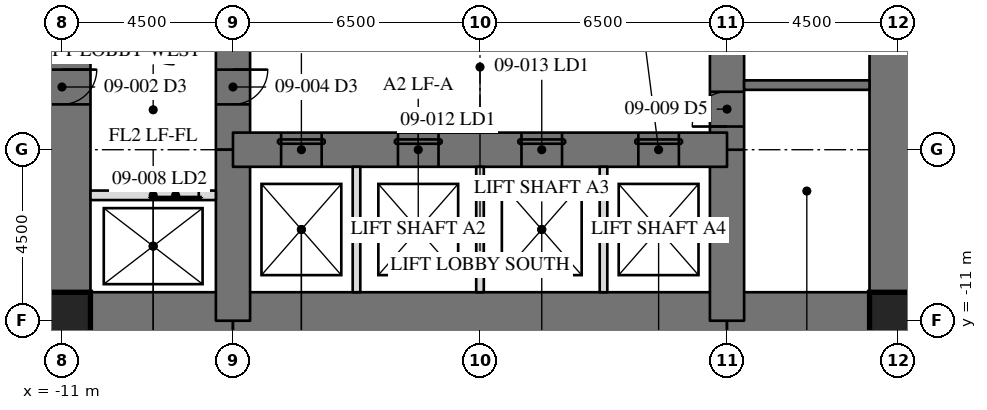
"""IFC4 building model, lengths in metres.
Left out: names, types, materials, properties, quantities, classifications, styles, units other than length and angle.
Written with IfcOpenShell. Run it as: python <this file> out.ifc"""

import sys

from ifc_helpers import new_model, si_unit, direction, frame, frame_2d, origin, origin_2d, place, context, subcontext, project, spatial, rectangle, hollow_rectangle, extrude, element, fill, save


model = new_model("IFC4")
c1 = context("Model", 3, precision=1e-05, world=origin(), true_north=direction((0.0, 1.0)))
c2 = subcontext(c1, "Body", "Model", "MODEL_VIEW")
j1 = project(units=[si_unit("LENGTHUNIT", "METRE"), si_unit("PLANEANGLEUNIT", "RADIAN")], contexts=[c1])
p1 = place(None, origin())
s1 = spatial("IfcSite", under=j1, at=p1, CompositionType="ELEMENT")
p2 = place(p1, origin())
s2 = spatial("IfcBuilding", under=s1, at=p2, CompositionType="ELEMENT")
p3 = place(p2, frame((0.0, 0.0, 40.6)))
s3 = spatial("IfcBuildingStorey", under=s2, at=p3, CompositionType="ELEMENT", Elevation=40.6)
p4 = place(p3, frame((11.0, -11.0, 0.0), z_axis=(0.0, 0.0, 1.0), x_axis=(0.0, 1.0, 0.0)))
e1 = element("IfcWall", 1, at=p4, inside=s3, PredefinedType="SHEAR", context=c2, shape_type="SweptSolid", body=[
    extrude(rectangle(XDim=22.0, YDim=1.5, at=frame_2d((11.0, 0.0))), origin(), (0.0, 0.0, 1.0), 4.1),
])
p5 = place(p4, frame((15.393, 0.0, 0.0)))
e2 = element("IfcOpeningElement", 2, at=p5, cuts=e1, PredefinedType="OPENING", context=c2, shape_type="SweptSolid", body=[
    extrude(rectangle(XDim=0.915, YDim=2.134, at=frame_2d((0.458, 1.067))), frame((0.0, 0.76, 0.0), z_axis=(0.0, -1.0, 0.0), x_axis=(1.0, 0.0, 0.0)), (0.0, 0.0, 1.0), 1.52),
])
p6 = place(p3, frame((-11.0, 11.0, 0.0), z_axis=(0.0, 0.0, 1.0), x_axis=(0.0, -1.0, 0.0)))
e3 = element("IfcWall", 3, at=p6, inside=s3, PredefinedType="SHEAR", context=c2, shape_type="SweptSolid", body=[
    extrude(rectangle(XDim=22.0, YDim=1.5, at=frame_2d((11.0, 0.0))), origin(), (0.0, 0.0, 1.0), 4.1),
])
p7 = place(p6, frame((15.393, 0.0, 0.0)))
e4 = element("IfcOpeningElement", 4, at=p7, cuts=e3, PredefinedType="OPENING", context=c2, shape_type="SweptSolid", body=[
    extrude(rectangle(XDim=0.915, YDim=2.134, at=frame_2d((0.458, 1.067))), frame((0.0, 0.76, 0.0), z_axis=(0.0, -1.0, 0.0), x_axis=(1.0, 0.0, 0.0)), (0.0, 0.0, 1.0), 1.52),
])
p8 = place(p3, frame((-11.0, -11.0, 0.0), z_axis=(0.0, 0.0, 1.0), x_axis=(1.0, 0.0, 0.0)))
e5 = element("IfcWall", 5, at=p8, inside=s3, PredefinedType="SHEAR", context=c2, shape_type="SweptSolid", body=[
    extrude(rectangle(XDim=4.5, YDim=1.5, at=frame_2d((2.25, 0.0))), origin(), (0.0, 0.0, 1.0), 4.1),
])
p9 = place(p3, frame((-6.5, -11.0, 0.0), z_axis=(0.0, 0.0, 1.0), x_axis=(1.0, 0.0, 0.0)))
e6 = element("IfcWall", 6, at=p9, inside=s3, PredefinedType="SHEAR", context=c2, shape_type="SweptSolid", body=[
    extrude(rectangle(XDim=13.0, YDim=1.5, at=frame_2d((6.5, 0.0))), origin(), (0.0, 0.0, 1.0), 4.1),
])
p10 = place(p3, frame((6.5, -11.0, 0.0), z_axis=(0.0, 0.0, 1.0), x_axis=(1.0, 0.0, 0.0)))
e7 = element("IfcWall", 7, at=p10, inside=s3, PredefinedType="SHEAR", context=c2, shape_type="SweptSolid", body=[
    extrude(rectangle(XDim=4.5, YDim=1.5, at=frame_2d((2.25, 0.0))), origin(), (0.0, 0.0, 1.0), 4.1),
])
p11 = place(p3, frame((6.5, -11.0, 0.0), z_axis=(0.0, 0.0, 1.0), x_axis=(0.0, 1.0, 0.0)))
e8 = element("IfcWall", 8, at=p11, inside=s3, PredefinedType="SHEAR", context=c2, shape_type="SweptSolid", body=[
    extrude(rectangle(XDim=4.5, YDim=0.9, at=frame_2d((2.25, 0.0))), origin(), (0.0, 0.0, 1.0), 4.1),
])
p12 = place(p3, frame((6.5, -6.5, 0.0), z_axis=(0.0, 0.0, 1.0), x_axis=(0.0, 1.0, 0.0)))
e9 = element("IfcWall", 9, at=p12, inside=s3, PredefinedType="SHEAR", context=c2, shape_type="SweptSolid", body=[
    extrude(rectangle(XDim=13.0, YDim=0.9, at=frame_2d((6.5, 0.0))), origin(), (0.0, 0.0, 1.0), 4.1),
])
p13 = place(p12, frame((10.893, 0.0, 0.0)))
e10 = element("IfcOpeningElement", 10, at=p13, cuts=e9, PredefinedType="OPENING", context=c2, shape_type="SweptSolid", body=[
    extrude(rectangle(XDim=0.915, YDim=2.134, at=frame_2d((0.458, 1.067))), frame((0.0, 0.46, 0.0), z_axis=(0.0, -1.0, 0.0), x_axis=(1.0, 0.0, 0.0)), (0.0, 0.0, 1.0), 0.92),
])
p14 = place(p12, frame((0.61, 0.0, 0.0)))
e11 = element("IfcOpeningElement", 11, at=p14, cuts=e9, PredefinedType="OPENING", context=c2, shape_type="SweptSolid", body=[
    extrude(rectangle(XDim=0.915, YDim=2.134, at=frame_2d((0.458, 1.067))), frame((0.0, 0.46, 0.0), z_axis=(0.0, -1.0, 0.0), x_axis=(1.0, 0.0, 0.0)), (0.0, 0.0, 1.0), 0.92),
])
p15 = place(p3, frame((-6.5, 6.5, 0.0), z_axis=(0.0, 0.0, 1.0), x_axis=(0.0, -1.0, 0.0)))
e12 = element("IfcWall", 12, at=p15, inside=s3, PredefinedType="SHEAR", context=c2, shape_type="SweptSolid", body=[
    extrude(rectangle(XDim=13.0, YDim=0.9, at=frame_2d((6.5, 0.0))), origin(), (0.0, 0.0, 1.0), 4.1),
])
p16 = place(p15, frame((10.893, 0.0, 0.0)))
e13 = element("IfcOpeningElement", 13, at=p16, cuts=e12, PredefinedType="OPENING", context=c2, shape_type="SweptSolid", body=[
    extrude(rectangle(XDim=0.915, YDim=2.134, at=frame_2d((0.458, 1.067))), frame((0.0, 0.46, 0.0), z_axis=(0.0, -1.0, 0.0), x_axis=(1.0, 0.0, 0.0)), (0.0, 0.0, 1.0), 0.92),
])
p17 = place(p15, frame((0.61, 0.0, 0.0)))
e14 = element("IfcOpeningElement", 14, at=p17, cuts=e12, PredefinedType="OPENING", context=c2, shape_type="SweptSolid", body=[
    extrude(rectangle(XDim=0.915, YDim=2.134, at=frame_2d((0.458, 1.067))), frame((0.0, 0.46, 0.0), z_axis=(0.0, -1.0, 0.0), x_axis=(1.0, 0.0, 0.0)), (0.0, 0.0, 1.0), 0.92),
])
p18 = place(p3, frame((-6.5, -6.5, 0.0), z_axis=(0.0, 0.0, 1.0), x_axis=(0.0, -1.0, 0.0)))
e15 = element("IfcWall", 15, at=p18, inside=s3, PredefinedType="SHEAR", context=c2, shape_type="SweptSolid", body=[
    extrude(rectangle(XDim=4.5, YDim=0.9, at=frame_2d((2.25, 0.0))), origin(), (0.0, 0.0, 1.0), 4.1),
])
p19 = place(p3, frame((-6.5, -6.5, 0.0), z_axis=(0.0, 0.0, 1.0), x_axis=(1.0, 0.0, 0.0)))
e16 = element("IfcWall", 16, at=p19, inside=s3, PredefinedType="SHEAR", context=c2, shape_type="SweptSolid", body=[
    extrude(rectangle(XDim=13.0, YDim=0.9, at=frame_2d((6.5, 0.0))), origin(), (0.0, 0.0, 1.0), 4.1),
])
p20 = place(p19, frame((1.267, 0.0, 0.0)))
e17 = element("IfcOpeningElement", 17, at=p20, cuts=e16, PredefinedType="OPENING", context=c2, shape_type="SweptSolid", body=[
    extrude(rectangle(XDim=1.067, YDim=2.134, at=frame_2d((0.533, 1.067))), frame((0.0, 0.46, 0.0), z_axis=(0.0, -1.0, 0.0), x_axis=(1.0, 0.0, 0.0)), (0.0, 0.0, 1.0), 0.92),
])
p21 = place(p19, frame((4.342, 0.0, 0.0)))
e18 = element("IfcOpeningElement", 18, at=p21, cuts=e16, PredefinedType="OPENING", context=c2, shape_type="SweptSolid", body=[
    extrude(rectangle(XDim=1.067, YDim=2.134, at=frame_2d((0.533, 1.067))), frame((0.0, 0.46, 0.0), z_axis=(0.0, -1.0, 0.0), x_axis=(1.0, 0.0, 0.0)), (0.0, 0.0, 1.0), 0.92),
])
p22 = place(p19, frame((7.592, 0.0, 0.0)))
e19 = element("IfcOpeningElement", 19, at=p22, cuts=e16, PredefinedType="OPENING", context=c2, shape_type="SweptSolid", body=[
    extrude(rectangle(XDim=1.067, YDim=2.134, at=frame_2d((0.533, 1.067))), frame((0.0, 0.46, 0.0), z_axis=(0.0, -1.0, 0.0), x_axis=(1.0, 0.0, 0.0)), (0.0, 0.0, 1.0), 0.92),
])
p23 = place(p19, frame((10.667, 0.0, 0.0)))
e20 = element("IfcOpeningElement", 20, at=p23, cuts=e16, PredefinedType="OPENING", context=c2, shape_type="SweptSolid", body=[
    extrude(rectangle(XDim=1.067, YDim=2.134, at=frame_2d((0.533, 1.067))), frame((0.0, 0.46, 0.0), z_axis=(0.0, -1.0, 0.0), x_axis=(1.0, 0.0, 0.0)), (0.0, 0.0, 1.0), 0.92),
])
for number, where, z_axis, x_axis in (
    (21, (-11.0, -11.0, 0.0), (0.0, 0.0, 1.0), (1.0, 0.0, 0.0)),
    (22, (11.0, -11.0, 0.0), (0.0, 0.0, 1.0), (1.0, 0.0, 0.0)),
):
    element("IfcColumn", number, at=place(p3, frame(where, z_axis=z_axis, x_axis=x_axis)), inside=s3, PredefinedType="COLUMN", context=c2, shape_type="SweptSolid", body=[
        extrude(hollow_rectangle(XDim=1.499, YDim=1.499, WallThickness=0.102, at=origin_2d()), origin(), (0.0, 0.0, 1.0), 4.1),
    ])
p24 = place(p3, frame((6.95, -4.8, 0.0), z_axis=(0.0, 0.0, 1.0), x_axis=(1.0, 0.0, 0.0)))
e23 = element("IfcWall", 23, at=p24, inside=s3, PredefinedType="SOLIDWALL", context=c2, shape_type="SweptSolid", body=[
    extrude(rectangle(XDim=3.3, YDim=0.25, at=frame_2d((1.65, 0.0))), origin(), (0.0, 0.0, 1.0), 3.91),
])
p25 = place(p3, frame((-6.95, -7.7, 0.0), z_axis=(0.0, 0.0, 1.0), x_axis=(-1.0, 0.0, 0.0)))
e24 = element("IfcWall", 24, at=p25, inside=s3, PredefinedType="PARTITIONING", context=c2, shape_type="SweptSolid", body=[
    extrude(rectangle(XDim=3.3, YDim=0.25, at=frame_2d((1.65, 0.0))), origin(), (0.0, 0.0, 1.0), 3.91),
])
p26 = place(p25, frame((0.45, 0.0, 0.0)))
e25 = element("IfcOpeningElement", 25, at=p26, cuts=e24, PredefinedType="OPENING", context=c2, shape_type="SweptSolid", body=[
    extrude(rectangle(XDim=1.219, YDim=2.134, at=frame_2d((0.609, 1.067))), frame((0.0, 0.135, 0.0), z_axis=(0.0, -1.0, 0.0), x_axis=(1.0, 0.0, 0.0)), (0.0, 0.0, 1.0), 0.27),
])
for number, where, z_axis, x_axis in (
    (26, (-3.25, -10.25, 0.0), (0.0, 0.0, 1.0), (0.0, 1.0, 0.0)),
    (27, (0.0, -10.25, 0.0), (0.0, 0.0, 1.0), (0.0, 1.0, 0.0)),
    (28, (3.25, -10.25, 0.0), (0.0, 0.0, 1.0), (0.0, 1.0, 0.0)),
):
    element("IfcWall", number, at=place(p3, frame(where, z_axis=z_axis, x_axis=x_axis)), inside=s3, PredefinedType="PARTITIONING", context=c2, shape_type="SweptSolid", body=[
        extrude(rectangle(XDim=3.3, YDim=0.2, at=frame_2d((1.65, 0.0))), origin(), (0.0, 0.0, 1.0), 3.91),
    ])
p27 = place(p16, origin())
e29 = element("IfcDoor", 29, at=p27, inside=s3, OperationType="SINGLE_SWING_RIGHT", PredefinedType="DOOR", context=c2, shape_type="SweptSolid", body=[
    extrude(rectangle(XDim=0.915, YDim=2.134, at=frame_2d((0.458, 1.067))), frame((0.0, -0.375, 0.0), z_axis=(0.0, -1.0, 0.0), x_axis=(1.0, 0.0, 0.0)), (0.0, 0.0, 1.0), 0.05),
])
fill(e13, e29)
p28 = place(p26, origin())
e30 = element("IfcDoor", 30, at=p28, inside=s3, OperationType="SLIDING_TO_LEFT", PredefinedType="DOOR", context=c2, shape_type="SweptSolid", body=[
    extrude(rectangle(XDim=1.219, YDim=2.134, at=frame_2d((0.609, 1.067))), frame((0.0, 0.025, 0.0), z_axis=(0.0, -1.0, 0.0), x_axis=(1.0, 0.0, 0.0)), (0.0, 0.0, 1.0), 0.05),
])
fill(e25, e30)
p29 = place(p14, origin())
e31 = element("IfcDoor", 31, at=p29, inside=s3, OperationType="SINGLE_SWING_RIGHT", PredefinedType="DOOR", context=c2, shape_type="SweptSolid", body=[
    extrude(rectangle(XDim=0.915, YDim=2.134, at=frame_2d((0.458, 1.067))), frame((0.0, -0.375, 0.0), z_axis=(0.0, -1.0, 0.0), x_axis=(1.0, 0.0, 0.0)), (0.0, 0.0, 1.0), 0.05),
])
fill(e11, e31)
p30 = place(p20, origin())
e32 = element("IfcDoor", 32, at=p30, inside=s3, OperationType="SLIDING_TO_LEFT", PredefinedType="DOOR", context=c2, shape_type="SweptSolid", body=[
    extrude(rectangle(XDim=1.067, YDim=2.134, at=frame_2d((0.533, 1.067))), frame((0.0, -0.375, 0.0), z_axis=(0.0, -1.0, 0.0), x_axis=(1.0, 0.0, 0.0)), (0.0, 0.0, 1.0), 0.05),
])
fill(e17, e32)
p31 = place(p21, origin())
e33 = element("IfcDoor", 33, at=p31, inside=s3, OperationType="SLIDING_TO_LEFT", PredefinedType="DOOR", context=c2, shape_type="SweptSolid", body=[
    extrude(rectangle(XDim=1.067, YDim=2.134, at=frame_2d((0.533, 1.067))), frame((0.0, -0.375, 0.0), z_axis=(0.0, -1.0, 0.0), x_axis=(1.0, 0.0, 0.0)), (0.0, 0.0, 1.0), 0.05),
])
fill(e18, e33)
p32 = place(p22, origin())
e34 = element("IfcDoor", 34, at=p32, inside=s3, OperationType="SLIDING_TO_LEFT", PredefinedType="DOOR", context=c2, shape_type="SweptSolid", body=[
    extrude(rectangle(XDim=1.067, YDim=2.134, at=frame_2d((0.533, 1.067))), frame((0.0, -0.375, 0.0), z_axis=(0.0, -1.0, 0.0), x_axis=(1.0, 0.0, 0.0)), (0.0, 0.0, 1.0), 0.05),
])
fill(e19, e34)
p33 = place(p23, origin())
e35 = element("IfcDoor", 35, at=p33, inside=s3, OperationType="SLIDING_TO_LEFT", PredefinedType="DOOR", context=c2, shape_type="SweptSolid", body=[
    extrude(rectangle(XDim=1.067, YDim=2.134, at=frame_2d((0.533, 1.067))), frame((0.0, -0.375, 0.0), z_axis=(0.0, -1.0, 0.0), x_axis=(1.0, 0.0, 0.0)), (0.0, 0.0, 1.0), 0.05),
])
fill(e20, e35)
save(model, sys.argv[1])
